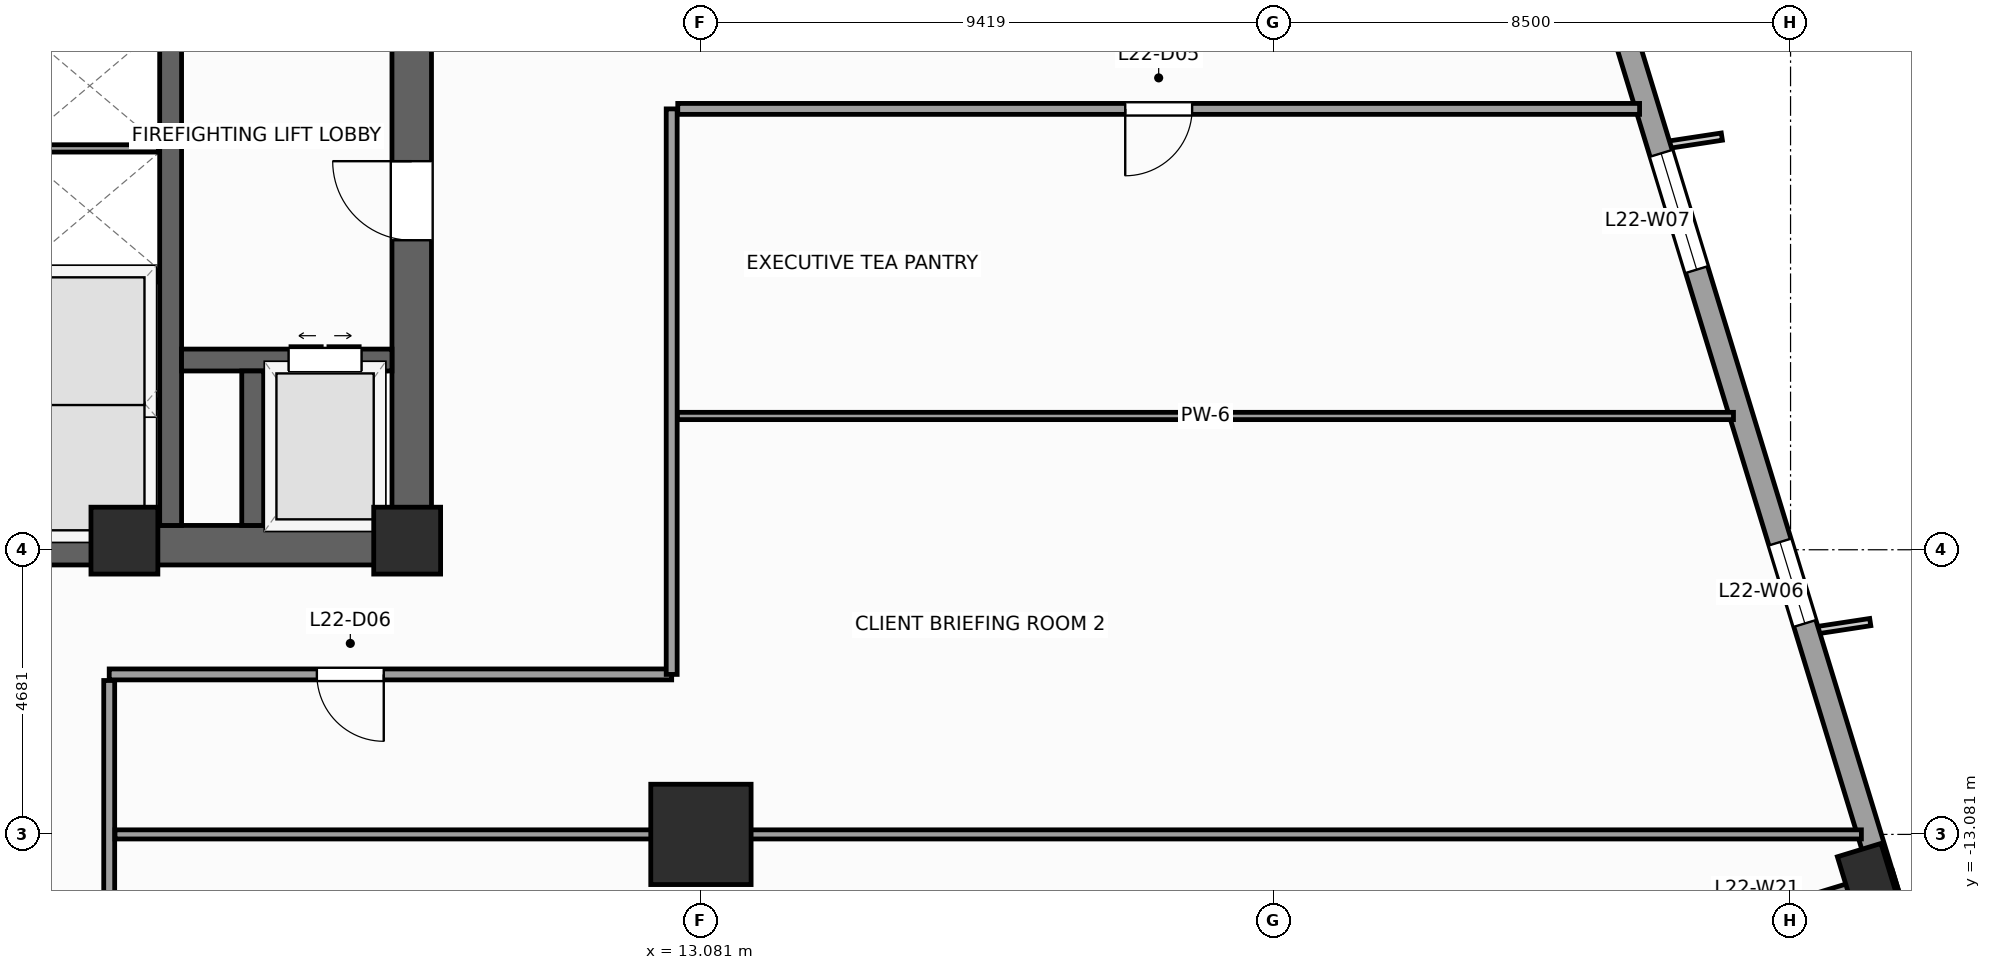
"""IFC4 building model, lengths in metres.
Left out: names, types, materials, properties, quantities, classifications, styles, units other than length and angle.
Written with IfcOpenShell. Run it as: python <this file> out.ifc"""

import sys

from ifc_helpers import new_model, si_unit, direction, frame, frame_2d, origin, origin_2d, place, context, subcontext, project, spatial, rectangle, extrude, source, transform, mapped, element, fill, save


model = new_model("IFC4")
c1 = context("Model", 3, precision=1e-05, world=origin(), true_north=direction((0.0, 1.0)))
c2 = subcontext(c1, "Body", "Model", "MODEL_VIEW")
j1 = project(units=[si_unit("LENGTHUNIT", "METRE"), si_unit("PLANEANGLEUNIT", "RADIAN")], contexts=[c1])
p1 = place(None, origin())
s1 = spatial("IfcSite", under=j1, at=p1, CompositionType="ELEMENT")
p2 = place(p1, origin())
s2 = spatial("IfcBuilding", under=s1, at=p2, CompositionType="ELEMENT")
p3 = place(p2, frame((0.0, 0.0, 95.2)))
s3 = spatial("IfcBuildingStorey", under=s2, at=p3, CompositionType="ELEMENT", Elevation=95.2)
p4 = place(p3, frame((-8.65, -8.325, 0.0), z_axis=(0.0, 0.0, 1.0), x_axis=(1.0, 0.0, 0.0)))
e1 = element("IfcWall", 1, at=p4, inside=s3, PredefinedType="SHEAR", context=c2, shape_type="SweptSolid", body=[
    extrude(rectangle(XDim=17.3, YDim=0.65, at=frame_2d((8.65, 0.0))), origin(), (0.0, 0.0, 1.0), 4.0),
])
p5 = place(p4, frame((8.0, 0.0, 0.0)))
e2 = element("IfcOpeningElement", 2, at=p5, cuts=e1, PredefinedType="OPENING", context=c2, shape_type="SweptSolid", body=[
    extrude(rectangle(XDim=1.3, YDim=2.2, at=frame_2d((0.65, 1.1))), frame((0.0, 0.335, 0.0), z_axis=(0.0, -1.0, 0.0), x_axis=(1.0, 0.0, 0.0)), (0.0, 0.0, 1.0), 0.67),
])
p6 = place(p3, frame((8.325, -8.0, 0.0), z_axis=(0.0, 0.0, 1.0), x_axis=(0.0, 1.0, 0.0)))
e3 = element("IfcWall", 3, at=p6, inside=s3, PredefinedType="SHEAR", context=c2, shape_type="SweptSolid", body=[
    extrude(rectangle(XDim=16.0, YDim=0.65, at=frame_2d((8.0, 0.0))), origin(), (0.0, 0.0, 1.0), 4.0),
])
p7 = place(p6, frame((4.69, 0.0, 0.0)))
e4 = element("IfcOpeningElement", 4, at=p7, cuts=e3, PredefinedType="OPENING", context=c2, shape_type="SweptSolid", body=[
    extrude(rectangle(XDim=1.3, YDim=2.2, at=frame_2d((0.65, 1.1))), frame((0.0, 0.335, 0.0), z_axis=(0.0, -1.0, 0.0), x_axis=(1.0, 0.0, 0.0)), (0.0, 0.0, 1.0), 0.67),
])
p8 = place(p3, frame((4.36, -8.0, 0.0), z_axis=(0.0, 0.0, 1.0), x_axis=(0.0, 1.0, 0.0)))
e5 = element("IfcWall", 5, at=p8, inside=s3, PredefinedType="SHEAR", context=c2, shape_type="SweptSolid", body=[
    extrude(rectangle(XDim=16.0, YDim=0.36, at=frame_2d((8.0, 0.0))), origin(), (0.0, 0.0, 1.0), 4.0),
])
p9 = place(p3, frame((4.54, -5.28, 0.0), z_axis=(0.0, 0.0, 1.0), x_axis=(1.0, 0.0, 0.0)))
e6 = element("IfcWall", 6, at=p9, inside=s3, PredefinedType="SHEAR", context=c2, shape_type="SweptSolid", body=[
    extrude(rectangle(XDim=3.46, YDim=0.36, at=frame_2d((1.73, 0.0))), origin(), (0.0, 0.0, 1.0), 4.0),
])
p10 = place(p9, frame((1.76, 0.0, 0.0)))
e7 = element("IfcOpeningElement", 7, at=p10, cuts=e6, PredefinedType="OPENING", context=c2, shape_type="SweptSolid", body=[
    extrude(rectangle(XDim=1.2, YDim=2.25, at=frame_2d((0.6, 1.125))), frame((0.0, 0.19, 0.0), z_axis=(0.0, -1.0, 0.0), x_axis=(1.0, 0.0, 0.0)), (0.0, 0.0, 1.0), 0.38),
])
p11 = place(p3, frame((5.71, -8.0, 0.0), z_axis=(0.0, 0.0, 1.0), x_axis=(0.0, 1.0, 0.0)))
e8 = element("IfcWall", 8, at=p11, inside=s3, PredefinedType="SHEAR", context=c2, shape_type="SweptSolid", body=[
    extrude(rectangle(XDim=2.54, YDim=0.36, at=frame_2d((1.27, 0.0))), origin(), (0.0, 0.0, 1.0), 4.0),
])
m1 = source(origin(), c2, "Body", "SweptSolid", [
    extrude(rectangle(XDim=1.1, YDim=1.1, at=origin_2d()), origin(), (0.0, 0.0, 1.0), 4.0),
])
for number, where, z_axis, x_axis in (
    (9, (8.25, -8.25, 0.0), (0.0, 0.0, 1.0), (1.0, 0.0, 0.0)),
    (10, (3.6, -8.25, 0.0), (0.0, 0.0, 1.0), (1.0, 0.0, 0.0)),
):
    element("IfcColumn", number, at=place(p3, frame(where, z_axis=z_axis, x_axis=x_axis)), inside=s3, PredefinedType="PILASTER", context=c2, shape_type="MappedRepresentation", body=[
        mapped(m1, transform((0.0, 0.0, 0.0), scale=1.0)),
    ])
m2 = source(origin(), c2, "Body", "SweptSolid", [
    extrude(rectangle(XDim=1.65, YDim=1.65, at=origin_2d()), origin(), (0.0, 0.0, 1.0), 4.0),
])
p12 = place(p3, frame((13.081, -13.081, 0.0), z_axis=(0.0, 0.0, 1.0), x_axis=(1.0, 0.0, 0.0)))
e11 = element("IfcColumn", 11, at=p12, inside=s3, PredefinedType="COLUMN", context=c2, shape_type="MappedRepresentation", body=[
    mapped(m2, transform((0.0, 0.0, 0.0), scale=1.0)),
])
m3 = source(origin(), c2, "Body", "SweptSolid", [
    extrude(rectangle(XDim=0.75, YDim=0.85, at=origin_2d()), origin(), (0.0, 0.0, 1.0), 4.0),
])
p13 = place(p3, frame((32.253, -13.746, 0.0), z_axis=(0.0, 0.0, 1.0), x_axis=(0.956304755963, 0.292371704723, 0.0)))
e12 = element("IfcColumn", 12, at=p13, inside=s3, PredefinedType="COLUMN", context=c2, shape_type="MappedRepresentation", body=[
    mapped(m3, transform((0.0, 0.0, 0.0), scale=1.0)),
])
p14 = place(p3, frame((28.482, -15.144, 0.0), z_axis=(0.0, 0.0, 1.0), x_axis=(0.956304176051, 0.292373601522, 0.0)))
e13 = element("IfcWall", 13, at=p14, inside=s3, PredefinedType="STANDARD", context=c2, shape_type="SweptSolid", body=[
    extrude(rectangle(XDim=4.44, YDim=0.38, at=frame_2d((2.22, 0.0))), origin(), (0.0, 0.0, 1.0), 3.04),
])
p15 = place(p14, frame((1.52, 0.0, 0.51)))
e14 = element("IfcOpeningElement", 14, at=p15, cuts=e13, PredefinedType="OPENING", context=c2, shape_type="SweptSolid", body=[
    extrude(rectangle(XDim=1.4, YDim=2.4, at=frame_2d((0.7, 1.2))), frame((0.0, 0.2, 0.0), z_axis=(0.0, -1.0, 0.0), x_axis=(1.0, 0.0, 0.0)), (0.0, 0.0, 1.0), 0.4),
])
p16 = place(p3, frame((32.658, -14.265, 0.0), z_axis=(0.0, 0.0, 1.0), x_axis=(-0.292373127906, 0.956304320851, 0.0)))
e15 = element("IfcWall", 15, at=p16, inside=s3, PredefinedType="STANDARD", context=c2, shape_type="SweptSolid", body=[
    extrude(rectangle(XDim=46.38, YDim=0.38, at=frame_2d((23.19, 0.0))), origin(), (0.0, 0.0, 1.0), 3.14),
])
p17 = place(p16, frame((28.265, 0.0, 0.0)))
e16 = element("IfcOpeningElement", 16, at=p17, cuts=e15, PredefinedType="OPENING", context=c2, shape_type="SweptSolid", body=[
    extrude(rectangle(XDim=1.05, YDim=2.25, at=frame_2d((0.525, 1.125))), frame((0.0, 0.2, 0.0), z_axis=(0.0, -1.0, 0.0), x_axis=(1.0, 0.0, 0.0)), (0.0, 0.0, 1.0), 0.4),
])
p18 = place(p16, frame((4.865, 0.0, 0.51)))
e17 = element("IfcOpeningElement", 17, at=p18, cuts=e15, PredefinedType="OPENING", context=c2, shape_type="SweptSolid", body=[
    extrude(rectangle(XDim=1.4, YDim=2.4, at=frame_2d((0.7, 1.2))), frame((0.0, 0.2, 0.0), z_axis=(0.0, -1.0, 0.0), x_axis=(1.0, 0.0, 0.0)), (0.0, 0.0, 1.0), 0.4),
])
p19 = place(p16, frame((10.95, 0.0, 0.51)))
e18 = element("IfcOpeningElement", 18, at=p19, cuts=e15, PredefinedType="OPENING", context=c2, shape_type="SweptSolid", body=[
    extrude(rectangle(XDim=2.0, YDim=2.4, at=frame_2d((1.0, 1.2))), frame((0.0, 0.2, 0.0), z_axis=(0.0, -1.0, 0.0), x_axis=(1.0, 0.0, 0.0)), (0.0, 0.0, 1.0), 0.4),
])
p20 = place(p16, frame((20.512, 0.0, 0.51)))
e19 = element("IfcOpeningElement", 19, at=p20, cuts=e15, PredefinedType="OPENING", context=c2, shape_type="SweptSolid", body=[
    extrude(rectangle(XDim=2.0, YDim=2.4, at=frame_2d((1.0, 1.2))), frame((0.0, 0.2, 0.0), z_axis=(0.0, -1.0, 0.0), x_axis=(1.0, 0.0, 0.0)), (0.0, 0.0, 1.0), 0.4),
])
p21 = place(p16, frame((30.538, 0.0, 0.51)))
e20 = element("IfcOpeningElement", 20, at=p21, cuts=e15, PredefinedType="OPENING", context=c2, shape_type="SweptSolid", body=[
    extrude(rectangle(XDim=2.0, YDim=2.4, at=frame_2d((1.0, 1.2))), frame((0.0, 0.2, 0.0), z_axis=(0.0, -1.0, 0.0), x_axis=(1.0, 0.0, 0.0)), (0.0, 0.0, 1.0), 0.4),
])
p22 = place(p16, frame((39.187, 0.0, 0.51)))
e21 = element("IfcOpeningElement", 21, at=p22, cuts=e15, PredefinedType="OPENING", context=c2, shape_type="SweptSolid", body=[
    extrude(rectangle(XDim=1.4, YDim=2.4, at=frame_2d((0.7, 1.2))), frame((0.0, 0.2, 0.0), z_axis=(0.0, -1.0, 0.0), x_axis=(1.0, 0.0, 0.0)), (0.0, 0.0, 1.0), 0.4),
])
p23 = place(p3, frame((1.89, -3.9, 0.0), z_axis=(0.0, 0.0, 1.0), x_axis=(1.0, 0.0, 0.0)))
e22 = element("IfcWall", 22, at=p23, inside=s3, PredefinedType="PARTITIONING", context=c2, shape_type="SweptSolid", body=[
    extrude(rectangle(XDim=2.28, YDim=0.18, at=frame_2d((1.14, 0.0))), origin(), (0.0, 0.0, 1.0), 3.74),
])
for number, where, z_axis, x_axis in (
    (23, (1.9, -6.0, 0.0), (0.0, 0.0, 1.0), (1.0, 0.0, 0.0)),
    (24, (1.9, -1.8, 0.0), (0.0, 0.0, 1.0), (1.0, 0.0, 0.0)),
):
    element("IfcWall", number, at=place(p3, frame(where, z_axis=z_axis, x_axis=x_axis)), inside=s3, PredefinedType="PARTITIONING", context=c2, shape_type="SweptSolid", body=[
        extrude(rectangle(XDim=2.26, YDim=0.12, at=frame_2d((1.13, 0.0))), origin(), (0.0, 0.0, 1.0), 3.74),
    ])
p24 = place(p3, frame((3.35, -10.45, 0.0), z_axis=(0.0, 0.0, 1.0), x_axis=(1.0, 0.0, 0.0)))
e25 = element("IfcWall", 25, at=p24, inside=s3, PredefinedType="PARTITIONING", context=c2, shape_type="SweptSolid", body=[
    extrude(rectangle(XDim=9.25, YDim=0.18, at=frame_2d((4.625, 0.0))), origin(), (0.0, 0.0, 1.0), 3.74),
])
p25 = place(p24, frame((3.415, 0.0, 0.0)))
e26 = element("IfcOpeningElement", 26, at=p25, cuts=e25, PredefinedType="OPENING", context=c2, shape_type="SweptSolid", body=[
    extrude(rectangle(XDim=1.1, YDim=2.2, at=frame_2d((0.55, 1.1))), frame((0.0, 0.1, 0.0), z_axis=(0.0, -1.0, 0.0), x_axis=(1.0, 0.0, 0.0)), (0.0, 0.0, 1.0), 0.2),
])
p26 = place(p3, frame((12.6, -10.45, 0.0), z_axis=(0.0, 0.0, 1.0), x_axis=(0.0, 1.0, 0.0)))
e27 = element("IfcWall", 27, at=p26, inside=s3, PredefinedType="PARTITIONING", context=c2, shape_type="SweptSolid", body=[
    extrude(rectangle(XDim=9.3, YDim=0.18, at=frame_2d((4.65, 0.0))), origin(), (0.0, 0.0, 1.0), 3.74),
])
p27 = place(p3, frame((12.7, -1.15, 0.0), z_axis=(0.0, 0.0, 1.0), x_axis=(1.0, 0.0, 0.0)))
e28 = element("IfcWall", 28, at=p27, inside=s3, PredefinedType="PARTITIONING", context=c2, shape_type="SweptSolid", body=[
    extrude(rectangle(XDim=15.817, YDim=0.18, at=frame_2d((7.909, 0.0))), origin(), (0.0, 0.0, 1.0), 3.74),
])
p28 = place(p27, frame((7.359, 0.0, 0.0)))
e29 = element("IfcOpeningElement", 29, at=p28, cuts=e28, PredefinedType="OPENING", context=c2, shape_type="SweptSolid", body=[
    extrude(rectangle(XDim=1.1, YDim=2.2, at=frame_2d((0.55, 1.1))), frame((0.0, 0.1, 0.0), z_axis=(0.0, -1.0, 0.0), x_axis=(1.0, 0.0, 0.0)), (0.0, 0.0, 1.0), 0.2),
])
p29 = place(p3, frame((3.35, -27.142, 0.0), z_axis=(0.0, 0.0, 1.0), x_axis=(0.0, 1.0, 0.0)))
e30 = element("IfcWall", 30, at=p29, inside=s3, PredefinedType="PARTITIONING", context=c2, shape_type="SweptSolid", body=[
    extrude(rectangle(XDim=16.592, YDim=0.18, at=frame_2d((8.296, 0.0))), origin(), (0.0, 0.0, 1.0), 3.74),
])
p30 = place(p29, frame((6.645, 0.0, 0.0)))
e31 = element("IfcOpeningElement", 31, at=p30, cuts=e30, PredefinedType="OPENING", context=c2, shape_type="SweptSolid", body=[
    extrude(rectangle(XDim=1.1, YDim=2.2, at=frame_2d((0.55, 1.1))), frame((0.0, 0.1, 0.0), z_axis=(0.0, -1.0, 0.0), x_axis=(1.0, 0.0, 0.0)), (0.0, 0.0, 1.0), 0.2),
])
p31 = place(p3, frame((3.445, -13.081, 0.0), z_axis=(0.0, 0.0, 1.0), x_axis=(1.0, 0.0, 0.0)))
e32 = element("IfcWall", 32, at=p31, inside=s3, PredefinedType="PARTITIONING", context=c2, shape_type="SweptSolid", body=[
    extrude(rectangle(XDim=28.72, YDim=0.15, at=frame_2d((14.36, 0.0))), origin(), (0.0, 0.0, 1.0), 2.732),
])
p32 = place(p3, frame((12.695, -6.2, 0.0), z_axis=(0.0, 0.0, 1.0), x_axis=(1.0, 0.0, 0.0)))
e33 = element("IfcWall", 33, at=p32, inside=s3, PredefinedType="PARTITIONING", context=c2, shape_type="SweptSolid", body=[
    extrude(rectangle(XDim=17.366, YDim=0.12, at=frame_2d((8.683, 0.0))), origin(), (0.0, 0.0, 1.0), 3.74),
])
m4 = source(origin(), c2, "Body", "SweptSolid", [
    extrude(rectangle(XDim=1.4, YDim=2.4, at=frame_2d((0.7, 1.2))), frame((0.0, 0.03, 0.0), z_axis=(0.0, -1.0, 0.0), x_axis=(1.0, 0.0, 0.0)), (0.0, 0.0, 1.0), 0.06),
])
p33 = place(p18, origin())
e34 = element("IfcWindow", 34, at=p33, inside=s3, PartitioningType="SINGLE_PANEL", PredefinedType="WINDOW", context=c2, shape_type="MappedRepresentation", body=[
    mapped(m4, transform((0.0, 0.0, 0.0), scale=1.0)),
])
fill(e17, e34)
m5 = source(origin(), c2, "Body", "SweptSolid", [
    extrude(rectangle(XDim=2.0, YDim=2.4, at=frame_2d((1.0, 1.2))), frame((0.0, 0.03, 0.0), z_axis=(0.0, -1.0, 0.0), x_axis=(1.0, 0.0, 0.0)), (0.0, 0.0, 1.0), 0.06),
])
p34 = place(p19, origin())
e35 = element("IfcWindow", 35, at=p34, inside=s3, PartitioningType="SINGLE_PANEL", PredefinedType="WINDOW", context=c2, shape_type="MappedRepresentation", body=[
    mapped(m5, transform((0.0, 0.0, 0.0), scale=1.0)),
])
fill(e18, e35)
m6 = source(origin(), c2, "Body", "SweptSolid", [
    extrude(rectangle(XDim=1.3, YDim=2.2, at=frame_2d((0.65, 1.1))), frame((0.0, 0.025, 0.0), z_axis=(0.0, -1.0, 0.0), x_axis=(1.0, 0.0, 0.0)), (0.0, 0.0, 1.0), 0.05),
])
p35 = place(p7, origin())
e36 = element("IfcDoor", 36, at=p35, inside=s3, OperationType="SINGLE_SWING_RIGHT", PredefinedType="DOOR", context=c2, shape_type="MappedRepresentation", body=[
    mapped(m6, transform((0.0, 0.0, 0.0), scale=1.0)),
])
fill(e4, e36)
m7 = source(origin(), c2, "Body", "SweptSolid", [
    extrude(rectangle(XDim=1.2, YDim=2.25, at=frame_2d((0.6, 1.125))), frame((0.0, 0.025, 0.0), z_axis=(0.0, -1.0, 0.0), x_axis=(1.0, 0.0, 0.0)), (0.0, 0.0, 1.0), 0.05),
])
p36 = place(p10, origin())
e37 = element("IfcDoor", 37, at=p36, inside=s3, OperationType="DOUBLE_DOOR_SLIDING", PredefinedType="DOOR", context=c2, shape_type="MappedRepresentation", body=[
    mapped(m7, transform((0.0, 0.0, 0.0), scale=1.0)),
])
fill(e7, e37)
m8 = source(origin(), c2, "Body", "SweptSolid", [
    extrude(rectangle(XDim=1.1, YDim=2.2, at=frame_2d((0.55, 1.1))), frame((0.0, 0.025, 0.0), z_axis=(0.0, -1.0, 0.0), x_axis=(1.0, 0.0, 0.0)), (0.0, 0.0, 1.0), 0.05),
])
p37 = place(p28, frame((1.1, 0.0, 0.0), z_axis=(0.0, 0.0, 1.0), x_axis=(-1.0, 0.0, 0.0)))
e38 = element("IfcDoor", 38, at=p37, inside=s3, OperationType="SINGLE_SWING_LEFT", PredefinedType="DOOR", context=c2, shape_type="MappedRepresentation", body=[
    mapped(m8, transform((0.0, 0.0, 0.0), scale=1.0)),
])
fill(e29, e38)
p38 = place(p25, frame((1.1, 0.0, 0.0), z_axis=(0.0, 0.0, 1.0), x_axis=(-1.0, 0.0, 0.0)))
e39 = element("IfcDoor", 39, at=p38, inside=s3, OperationType="SINGLE_SWING_RIGHT", PredefinedType="DOOR", context=c2, shape_type="MappedRepresentation", body=[
    mapped(m8, transform((0.0, 0.0, 0.0), scale=1.0)),
])
fill(e26, e39)
save(model, sys.argv[1])
